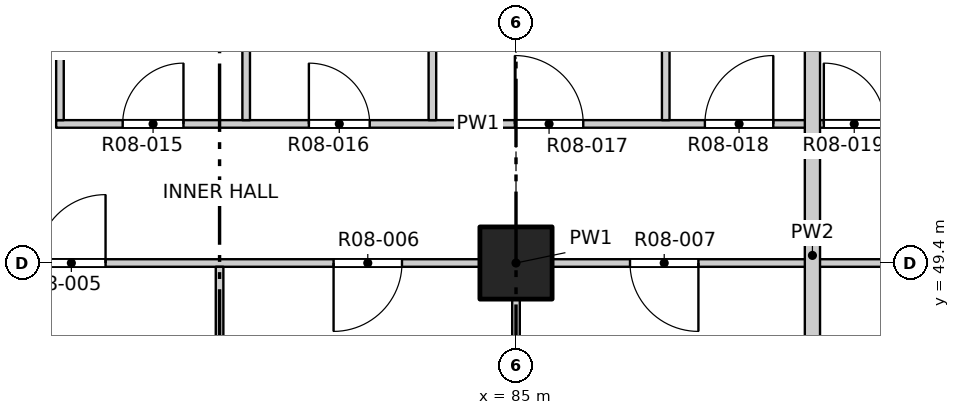
"""IFC4 building model, lengths in metres.
Left out: names, types, materials, properties, quantities, classifications, styles, units other than length and angle.
Written with IfcOpenShell. Run it as: python <this file> out.ifc"""

import sys

from ifc_helpers import new_model, si_unit, direction, frame, frame_2d, origin, origin_2d, place, context, subcontext, project, spatial, rectangle, extrude, element, fill, save


model = new_model("IFC4")
c1 = context("Model", 3, precision=1e-05, world=origin(), true_north=direction((0.0, 1.0)))
c2 = subcontext(c1, "Body", "Model", "MODEL_VIEW")
j1 = project(units=[si_unit("LENGTHUNIT", "METRE"), si_unit("PLANEANGLEUNIT", "RADIAN")], contexts=[c1])
p1 = place(None, origin())
s1 = spatial("IfcSite", under=j1, at=p1, CompositionType="ELEMENT")
p2 = place(p1, origin())
s2 = spatial("IfcBuilding", under=s1, at=p2, CompositionType="ELEMENT")
p3 = place(p2, frame((0.0, 0.0, 103.3)))
s3 = spatial("IfcBuildingStorey", under=s2, at=p3, CompositionType="ELEMENT", Elevation=103.3)
p4 = place(p3, frame((85.0, 49.4, -0.25), z_axis=(0.0, 0.0, 1.0), x_axis=(1.0, 0.0, 0.0)))
e1 = element("IfcColumn", 1, at=p4, inside=s3, PredefinedType="COLUMN", context=c2, shape_type="SweptSolid", body=[
    extrude(rectangle(XDim=0.95, YDim=0.95, at=origin_2d()), origin(), (0.0, 0.0, 1.0), 3.4),
])
p5 = place(p3, frame((65.8, 49.4, 0.0), z_axis=(0.0, 0.0, 1.0), x_axis=(1.0, 0.0, 0.0)))
e2 = element("IfcWall", 2, at=p5, inside=s3, PredefinedType="PARTITIONING", context=c2, shape_type="SweptSolid", body=[
    extrude(rectangle(XDim=38.4, YDim=0.1, at=frame_2d((19.2, 0.0))), origin(), (0.0, 0.0, 1.0), 3.15),
])
p6 = place(p5, frame((4.19, 0.0, 0.0)))
e3 = element("IfcOpeningElement", 3, at=p6, cuts=e2, PredefinedType="OPENING", context=c2, shape_type="SweptSolid", body=[
    extrude(rectangle(XDim=0.9, YDim=2.1, at=frame_2d((0.45, 1.05))), frame((0.0, 0.06, 0.0), z_axis=(0.0, -1.0, 0.0), x_axis=(1.0, 0.0, 0.0)), (0.0, 0.0, 1.0), 0.12),
])
p7 = place(p5, frame((9.0, 0.0, 0.0)))
e4 = element("IfcOpeningElement", 4, at=p7, cuts=e2, PredefinedType="OPENING", context=c2, shape_type="SweptSolid", body=[
    extrude(rectangle(XDim=0.9, YDim=2.1, at=frame_2d((0.45, 1.05))), frame((0.0, 0.06, 0.0), z_axis=(0.0, -1.0, 0.0), x_axis=(1.0, 0.0, 0.0)), (0.0, 0.0, 1.0), 0.12),
])
p8 = place(p5, frame((12.9, 0.0, 0.0)))
e5 = element("IfcOpeningElement", 5, at=p8, cuts=e2, PredefinedType="OPENING", context=c2, shape_type="SweptSolid", body=[
    extrude(rectangle(XDim=0.9, YDim=2.1, at=frame_2d((0.45, 1.05))), frame((0.0, 0.06, 0.0), z_axis=(0.0, -1.0, 0.0), x_axis=(1.0, 0.0, 0.0)), (0.0, 0.0, 1.0), 0.12),
])
p9 = place(p5, frame((16.8, 0.0, 0.0)))
e6 = element("IfcOpeningElement", 6, at=p9, cuts=e2, PredefinedType="OPENING", context=c2, shape_type="SweptSolid", body=[
    extrude(rectangle(XDim=0.9, YDim=2.1, at=frame_2d((0.45, 1.05))), frame((0.0, 0.06, 0.0), z_axis=(0.0, -1.0, 0.0), x_axis=(1.0, 0.0, 0.0)), (0.0, 0.0, 1.0), 0.12),
])
p10 = place(p5, frame((20.7, 0.0, 0.0)))
e7 = element("IfcOpeningElement", 7, at=p10, cuts=e2, PredefinedType="OPENING", context=c2, shape_type="SweptSolid", body=[
    extrude(rectangle(XDim=0.9, YDim=2.1, at=frame_2d((0.45, 1.05))), frame((0.0, 0.06, 0.0), z_axis=(0.0, -1.0, 0.0), x_axis=(1.0, 0.0, 0.0)), (0.0, 0.0, 1.0), 0.12),
])
p11 = place(p5, frame((24.6, 0.0, 0.0)))
e8 = element("IfcOpeningElement", 8, at=p11, cuts=e2, PredefinedType="OPENING", context=c2, shape_type="SweptSolid", body=[
    extrude(rectangle(XDim=0.9, YDim=2.1, at=frame_2d((0.45, 1.05))), frame((0.0, 0.06, 0.0), z_axis=(0.0, -1.0, 0.0), x_axis=(1.0, 0.0, 0.0)), (0.0, 0.0, 1.0), 0.12),
])
p12 = place(p5, frame((28.5, 0.0, 0.0)))
e9 = element("IfcOpeningElement", 9, at=p12, cuts=e2, PredefinedType="OPENING", context=c2, shape_type="SweptSolid", body=[
    extrude(rectangle(XDim=0.9, YDim=2.1, at=frame_2d((0.45, 1.05))), frame((0.0, 0.06, 0.0), z_axis=(0.0, -1.0, 0.0), x_axis=(1.0, 0.0, 0.0)), (0.0, 0.0, 1.0), 0.12),
])
p13 = place(p5, frame((33.31, 0.0, 0.0)))
e10 = element("IfcOpeningElement", 10, at=p13, cuts=e2, PredefinedType="OPENING", context=c2, shape_type="SweptSolid", body=[
    extrude(rectangle(XDim=0.9, YDim=2.1, at=frame_2d((0.45, 1.05))), frame((0.0, 0.06, 0.0), z_axis=(0.0, -1.0, 0.0), x_axis=(1.0, 0.0, 0.0)), (0.0, 0.0, 1.0), 0.12),
])
p14 = place(p3, frame((78.95, 51.23, 0.0), z_axis=(0.0, 0.0, 1.0), x_axis=(1.0, 0.0, 0.0)))
e11 = element("IfcWall", 11, at=p14, inside=s3, PredefinedType="PARTITIONING", context=c2, shape_type="SweptSolid", body=[
    extrude(rectangle(XDim=11.1, YDim=0.1, at=frame_2d((5.55, 0.0))), origin(), (0.0, 0.0, 1.0), 3.15),
])
p15 = place(p14, frame((0.875, 0.0, 0.0)))
e12 = element("IfcOpeningElement", 12, at=p15, cuts=e11, PredefinedType="OPENING", context=c2, shape_type="SweptSolid", body=[
    extrude(rectangle(XDim=0.8, YDim=2.1, at=frame_2d((0.4, 1.05))), frame((0.0, 0.06, 0.0), z_axis=(0.0, -1.0, 0.0), x_axis=(1.0, 0.0, 0.0)), (0.0, 0.0, 1.0), 0.12),
])
p16 = place(p14, frame((3.325, 0.0, 0.0)))
e13 = element("IfcOpeningElement", 13, at=p16, cuts=e11, PredefinedType="OPENING", context=c2, shape_type="SweptSolid", body=[
    extrude(rectangle(XDim=0.8, YDim=2.1, at=frame_2d((0.4, 1.05))), frame((0.0, 0.06, 0.0), z_axis=(0.0, -1.0, 0.0), x_axis=(1.0, 0.0, 0.0)), (0.0, 0.0, 1.0), 0.12),
])
p17 = place(p14, frame((6.035, 0.0, 0.0)))
e14 = element("IfcOpeningElement", 14, at=p17, cuts=e11, PredefinedType="OPENING", context=c2, shape_type="SweptSolid", body=[
    extrude(rectangle(XDim=0.9, YDim=2.1, at=frame_2d((0.45, 1.05))), frame((0.0, 0.06, 0.0), z_axis=(0.0, -1.0, 0.0), x_axis=(1.0, 0.0, 0.0)), (0.0, 0.0, 1.0), 0.12),
])
p18 = place(p14, frame((8.535, 0.0, 0.0)))
e15 = element("IfcOpeningElement", 15, at=p18, cuts=e11, PredefinedType="OPENING", context=c2, shape_type="SweptSolid", body=[
    extrude(rectangle(XDim=0.9, YDim=2.1, at=frame_2d((0.45, 1.05))), frame((0.0, 0.06, 0.0), z_axis=(0.0, -1.0, 0.0), x_axis=(1.0, 0.0, 0.0)), (0.0, 0.0, 1.0), 0.12),
])
p19 = place(p14, frame((10.1, 0.0, 0.0)))
e16 = element("IfcOpeningElement", 16, at=p19, cuts=e11, PredefinedType="OPENING", context=c2, shape_type="SweptSolid", body=[
    extrude(rectangle(XDim=0.8, YDim=2.1, at=frame_2d((0.4, 1.05))), frame((0.0, 0.06, 0.0), z_axis=(0.0, -1.0, 0.0), x_axis=(1.0, 0.0, 0.0)), (0.0, 0.0, 1.0), 0.12),
])
p20 = place(p3, frame((79.0, 51.28, 0.0), z_axis=(0.0, 0.0, 1.0), x_axis=(0.0, 1.0, 0.0)))
e17 = element("IfcWall", 17, at=p20, inside=s3, PredefinedType="PARTITIONING", context=c2, shape_type="SweptSolid", body=[
    extrude(rectangle(XDim=1.92, YDim=0.1, at=frame_2d((0.96, 0.0))), origin(), (0.0, 0.0, 1.0), 3.15),
])
p21 = place(p3, frame((81.1, 45.8, 0.0), z_axis=(0.0, 0.0, 1.0), x_axis=(0.0, 1.0, 0.0)))
e18 = element("IfcWall", 18, at=p21, inside=s3, PredefinedType="PARTITIONING", context=c2, shape_type="SweptSolid", body=[
    extrude(rectangle(XDim=3.55, YDim=0.1, at=frame_2d((1.775, 0.0))), origin(), (0.0, 0.0, 1.0), 2.55),
])
for number, where, z_axis, x_axis in (
    (19, (81.45, 51.28, 0.0), (0.0, 0.0, 1.0), (0.0, 1.0, 0.0)),
    (20, (83.9, 51.28, 0.0), (0.0, 0.0, 1.0), (0.0, 1.0, 0.0)),
):
    element("IfcWall", number, at=place(p3, frame(where, z_axis=z_axis, x_axis=x_axis)), inside=s3, PredefinedType="PARTITIONING", context=c2, shape_type="SweptSolid", body=[
        extrude(rectangle(XDim=1.92, YDim=0.1, at=frame_2d((0.96, 0.0))), origin(), (0.0, 0.0, 1.0), 3.15),
    ])
p22 = place(p3, frame((85.0, 45.8, 0.0), z_axis=(0.0, 0.0, 1.0), x_axis=(0.0, 1.0, 0.0)))
e21 = element("IfcWall", 21, at=p22, inside=s3, PredefinedType="PARTITIONING", context=c2, shape_type="SweptSolid", body=[
    extrude(rectangle(XDim=3.55, YDim=0.1, at=frame_2d((1.775, 0.0))), origin(), (0.0, 0.0, 1.0), 3.15),
])
p23 = place(p3, frame((86.97, 51.28, 0.0), z_axis=(0.0, 0.0, 1.0), x_axis=(0.0, 1.0, 0.0)))
e22 = element("IfcWall", 22, at=p23, inside=s3, PredefinedType="PARTITIONING", context=c2, shape_type="SweptSolid", body=[
    extrude(rectangle(XDim=1.92, YDim=0.1, at=frame_2d((0.96, 0.0))), origin(), (0.0, 0.0, 1.0), 3.15),
])
p24 = place(p3, frame((88.9, 45.8, 0.0), z_axis=(0.0, 0.0, 1.0), x_axis=(0.0, 1.0, 0.0)))
e23 = element("IfcWall", 23, at=p24, inside=s3, PredefinedType="PARTITIONING", context=c2, shape_type="SweptSolid", body=[
    extrude(rectangle(XDim=7.4, YDim=0.2, at=frame_2d((3.7, 0.0))), origin(), (0.0, 0.0, 1.0), 2.55),
])
p25 = place(p8, origin())
e24 = element("IfcDoor", 24, at=p25, inside=s3, OperationType="SINGLE_SWING_RIGHT", PredefinedType="DOOR", context=c2, shape_type="SweptSolid", body=[
    extrude(rectangle(XDim=0.9, YDim=2.1, at=frame_2d((0.45, 1.05))), frame((0.0, 0.025, 0.0), z_axis=(0.0, -1.0, 0.0), x_axis=(1.0, 0.0, 0.0)), (0.0, 0.0, 1.0), 0.05),
])
fill(e5, e24)
p26 = place(p9, origin())
e25 = element("IfcDoor", 25, at=p26, inside=s3, OperationType="SINGLE_SWING_RIGHT", PredefinedType="DOOR", context=c2, shape_type="SweptSolid", body=[
    extrude(rectangle(XDim=0.9, YDim=2.1, at=frame_2d((0.45, 1.05))), frame((0.0, 0.025, 0.0), z_axis=(0.0, -1.0, 0.0), x_axis=(1.0, 0.0, 0.0)), (0.0, 0.0, 1.0), 0.05),
])
fill(e6, e25)
p27 = place(p10, origin())
e26 = element("IfcDoor", 26, at=p27, inside=s3, OperationType="SINGLE_SWING_LEFT", PredefinedType="DOOR", context=c2, shape_type="SweptSolid", body=[
    extrude(rectangle(XDim=0.9, YDim=2.1, at=frame_2d((0.45, 1.05))), frame((0.0, 0.025, 0.0), z_axis=(0.0, -1.0, 0.0), x_axis=(1.0, 0.0, 0.0)), (0.0, 0.0, 1.0), 0.05),
])
fill(e7, e26)
p28 = place(p15, origin())
e27 = element("IfcDoor", 27, at=p28, inside=s3, OperationType="SINGLE_SWING_RIGHT", PredefinedType="DOOR", context=c2, shape_type="SweptSolid", body=[
    extrude(rectangle(XDim=0.8, YDim=2.1, at=frame_2d((0.4, 1.05))), frame((0.0, 0.025, 0.0), z_axis=(0.0, -1.0, 0.0), x_axis=(1.0, 0.0, 0.0)), (0.0, 0.0, 1.0), 0.05),
])
fill(e12, e27)
p29 = place(p16, origin())
e28 = element("IfcDoor", 28, at=p29, inside=s3, OperationType="SINGLE_SWING_LEFT", PredefinedType="DOOR", context=c2, shape_type="SweptSolid", body=[
    extrude(rectangle(XDim=0.8, YDim=2.1, at=frame_2d((0.4, 1.05))), frame((0.0, 0.025, 0.0), z_axis=(0.0, -1.0, 0.0), x_axis=(1.0, 0.0, 0.0)), (0.0, 0.0, 1.0), 0.05),
])
fill(e13, e28)
p30 = place(p17, origin())
e29 = element("IfcDoor", 29, at=p30, inside=s3, OperationType="SINGLE_SWING_LEFT", PredefinedType="DOOR", context=c2, shape_type="SweptSolid", body=[
    extrude(rectangle(XDim=0.9, YDim=2.1, at=frame_2d((0.45, 1.05))), frame((0.0, 0.025, 0.0), z_axis=(0.0, -1.0, 0.0), x_axis=(1.0, 0.0, 0.0)), (0.0, 0.0, 1.0), 0.05),
])
fill(e14, e29)
p31 = place(p18, origin())
e30 = element("IfcDoor", 30, at=p31, inside=s3, OperationType="SINGLE_SWING_RIGHT", PredefinedType="DOOR", context=c2, shape_type="SweptSolid", body=[
    extrude(rectangle(XDim=0.9, YDim=2.1, at=frame_2d((0.45, 1.05))), frame((0.0, 0.025, 0.0), z_axis=(0.0, -1.0, 0.0), x_axis=(1.0, 0.0, 0.0)), (0.0, 0.0, 1.0), 0.05),
])
fill(e15, e30)
p32 = place(p19, origin())
e31 = element("IfcDoor", 31, at=p32, inside=s3, OperationType="SINGLE_SWING_LEFT", PredefinedType="DOOR", context=c2, shape_type="SweptSolid", body=[
    extrude(rectangle(XDim=0.8, YDim=2.1, at=frame_2d((0.4, 1.05))), frame((0.0, 0.025, 0.0), z_axis=(0.0, -1.0, 0.0), x_axis=(1.0, 0.0, 0.0)), (0.0, 0.0, 1.0), 0.05),
])
fill(e16, e31)
save(model, sys.argv[1])
